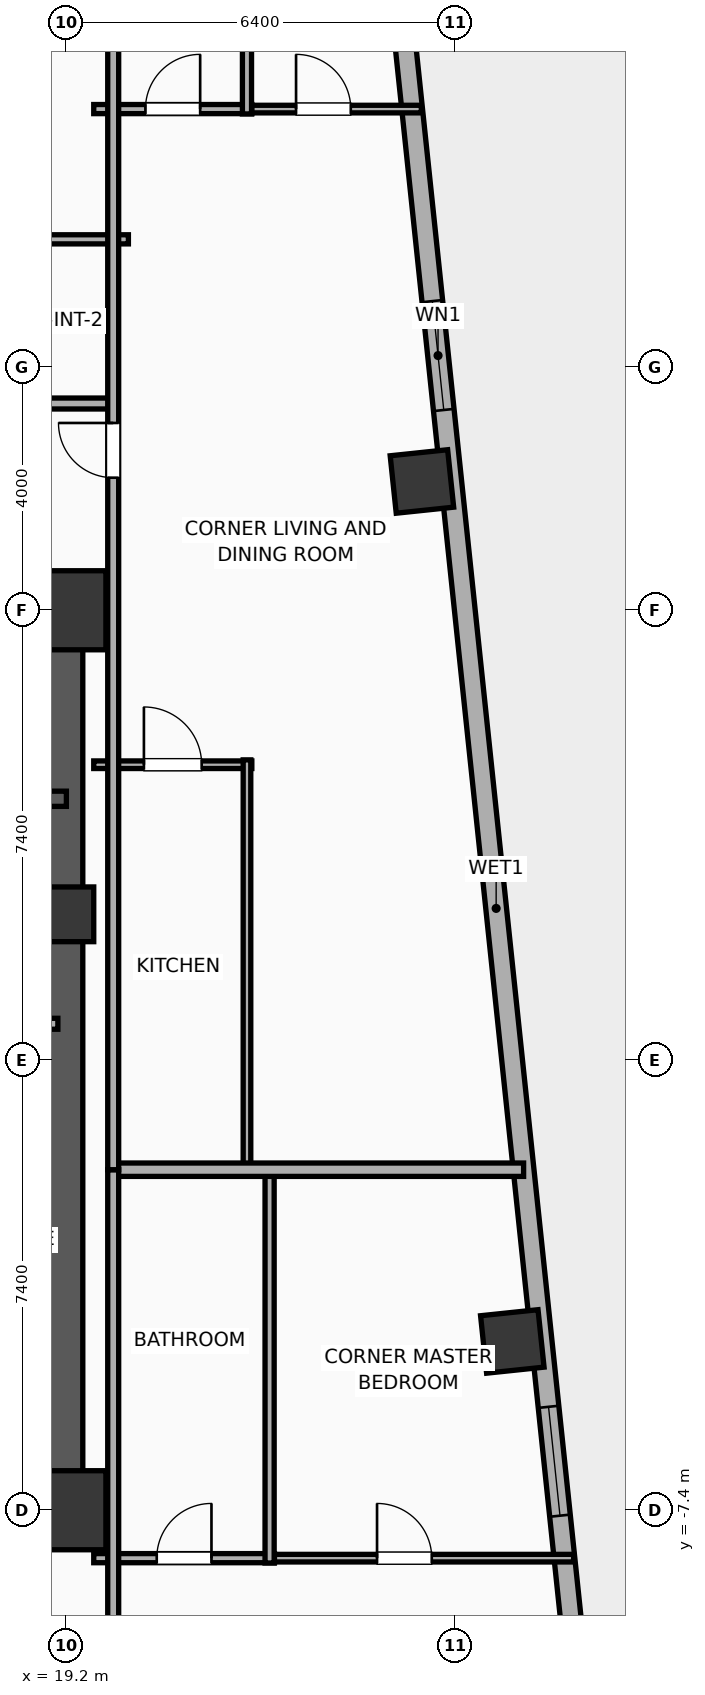
"""IFC4 building model, lengths in metres.
Left out: names, types, materials, properties, quantities, classifications, styles, units other than length and angle.
Written with IfcOpenShell. Run it as: python <this file> out.ifc"""

import sys

from ifc_helpers import new_model, si_unit, direction, frame, frame_2d, origin, origin_2d, place, context, subcontext, project, spatial, rectangle, hollow_rectangle, extrude, element, fill, save


model = new_model("IFC4")
c1 = context("Model", 3, precision=1e-05, world=origin(), true_north=direction((0.0, 1.0)))
c2 = subcontext(c1, "Body", "Model", "MODEL_VIEW")
j1 = project(units=[si_unit("LENGTHUNIT", "METRE"), si_unit("PLANEANGLEUNIT", "RADIAN")], contexts=[c1])
p1 = place(None, origin())
s1 = spatial("IfcSite", under=j1, at=p1, CompositionType="ELEMENT")
p2 = place(p1, origin())
s2 = spatial("IfcBuilding", under=s1, at=p2, CompositionType="ELEMENT")
p3 = place(p2, frame((0.0, 0.0, 140.4)))
s3 = spatial("IfcBuildingStorey", under=s2, at=p3, CompositionType="ELEMENT", Elevation=140.4)
p4 = place(p3, frame((19.2, -7.4, 0.0), z_axis=(0.0, 0.0, 1.0), x_axis=(1.0, 0.0, 0.0)))
e1 = element("IfcColumn", 1, at=p4, inside=s3, PredefinedType="COLUMN", context=c2, shape_type="SweptSolid", body=[
    extrude(rectangle(XDim=1.3, YDim=1.3, at=origin_2d()), origin(), (0.0, 0.0, 1.0), 3.9),
])
p5 = place(p3, frame((19.2, 2.4, 0.0), z_axis=(0.0, 0.0, 1.0), x_axis=(1.0, 0.0, 0.0)))
e2 = element("IfcColumn", 2, at=p5, inside=s3, PredefinedType="COLUMN", context=c2, shape_type="SweptSolid", body=[
    extrude(rectangle(XDim=0.9, YDim=0.9, at=origin_2d()), origin(), (0.0, 0.0, 1.0), 3.9),
])
p6 = place(p3, frame((19.2, 7.4, 0.0), z_axis=(0.0, 0.0, 1.0), x_axis=(1.0, 0.0, 0.0)))
e3 = element("IfcColumn", 3, at=p6, inside=s3, PredefinedType="COLUMN", context=c2, shape_type="SweptSolid", body=[
    extrude(rectangle(XDim=1.3, YDim=1.3, at=origin_2d()), origin(), (0.0, 0.0, 1.0), 3.9),
])
for number, where, z_axis, x_axis in (
    (4, (12.125, -7.4, 0.0), (0.0, 0.0, 1.0), (1.0, 0.0, 0.0)),
    (5, (12.125, 7.4, 0.0), (0.0, 0.0, 1.0), (1.0, 0.0, 0.0)),
):
    element("IfcWall", number, at=place(p3, frame(where, z_axis=z_axis, x_axis=x_axis)), inside=s3, PredefinedType="SHEAR", context=c2, shape_type="SweptSolid", body=[
        extrude(rectangle(XDim=7.35, YDim=0.55, at=frame_2d((3.675, 0.0))), origin(), (0.0, 0.0, 1.0), 3.65),
    ])
p7 = place(p3, frame((19.145, -7.4, 0.0), z_axis=(0.0, 0.0, 1.0), x_axis=(0.0, 1.0, 0.0)))
e6 = element("IfcWall", 6, at=p7, inside=s3, PredefinedType="SHEAR", context=c2, shape_type="SweptSolid", body=[
    extrude(rectangle(XDim=14.8, YDim=0.65, at=frame_2d((7.4, 0.0))), origin(), (0.0, 0.0, 1.0), 3.65),
])
p8 = place(p3, frame((15.74, -6.965, 0.0), z_axis=(0.0, 0.0, 1.0), x_axis=(1.0, 0.0, 0.0)))
e7 = element("IfcWall", 7, at=p8, inside=s3, PredefinedType="SOLIDWALL", context=c2, shape_type="SweptSolid", body=[
    extrude(rectangle(XDim=3.46, YDim=0.25, at=frame_2d((1.73, 0.0))), origin(), (0.0, 0.0, 1.0), 3.65),
])
for number, where, z_axis, x_axis in (
    (8, (26.533, -4.624, -0.4), (0.0, 0.0, 1.0), (0.995, 0.105, 0.0)),
    (9, (25.047, 9.518, -0.4), (0.0, 0.0, 1.0), (0.995, 0.105, 0.0)),
):
    element("IfcColumn", number, at=place(p3, frame(where, z_axis=z_axis, x_axis=x_axis)), inside=s3, PredefinedType="COLUMN", context=c2, shape_type="SweptSolid", body=[
        extrude(hollow_rectangle(XDim=0.95, YDim=0.95, WallThickness=0.032, at=origin_2d()), origin(), (0.0, 0.0, 1.0), 4.3),
    ])
p9 = place(p3, frame((24.534, 18.99, 0.0), z_axis=(0.0, 0.0, 1.0), x_axis=(0.104534959766, -0.994521212537, 0.0)))
e10 = element("IfcWall", 10, at=p9, inside=s3, PredefinedType="ELEMENTEDWALL", context=c2, shape_type="SweptSolid", body=[
    extrude(rectangle(XDim=33.166, YDim=0.34, at=frame_2d((16.583, 0.0))), origin(), (0.0, 0.0, 1.0), 2.54),
])
p10 = place(p9, frame((6.542, 0.0, 0.75)))
e11 = element("IfcOpeningElement", 11, at=p10, cuts=e10, PredefinedType="OPENING", context=c2, shape_type="SweptSolid", body=[
    extrude(rectangle(XDim=1.8, YDim=1.63, at=frame_2d((0.9, 0.815))), frame((0.0, 0.18, 0.0), z_axis=(0.0, -1.0, 0.0), x_axis=(1.0, 0.0, 0.0)), (0.0, 0.0, 1.0), 0.36),
])
p11 = place(p9, frame((24.825, 0.0, 0.75)))
e12 = element("IfcOpeningElement", 12, at=p11, cuts=e10, PredefinedType="OPENING", context=c2, shape_type="SweptSolid", body=[
    extrude(rectangle(XDim=1.8, YDim=1.63, at=frame_2d((0.9, 0.815))), frame((0.0, 0.18, 0.0), z_axis=(0.0, -1.0, 0.0), x_axis=(1.0, 0.0, 0.0)), (0.0, 0.0, 1.0), 0.36),
])
p12 = place(p3, frame((16.6, 4.3, 0.0), z_axis=(0.0, 0.0, 1.0), x_axis=(1.0, 0.0, 0.0)))
e13 = element("IfcWall", 13, at=p12, inside=s3, PredefinedType="SOLIDWALL", context=c2, shape_type="SweptSolid", body=[
    extrude(rectangle(XDim=2.6, YDim=0.25, at=frame_2d((1.3, 0.0))), origin(), (0.0, 0.0, 1.0), 3.65),
])
p13 = place(p3, frame((15.7, 0.6, 0.0), z_axis=(0.0, 0.0, 1.0), x_axis=(1.0, 0.0, 0.0)))
e14 = element("IfcWall", 14, at=p13, inside=s3, PredefinedType="PARTITIONING", context=c2, shape_type="SweptSolid", body=[
    extrude(rectangle(XDim=3.36, YDim=0.18, at=frame_2d((1.68, 0.0))), origin(), (0.0, 0.0, 1.0), 3.65),
])
p14 = place(p13, frame((1.155, 0.0, 0.0)))
e15 = element("IfcOpeningElement", 15, at=p14, cuts=e14, PredefinedType="OPENING", context=c2, shape_type="SweptSolid", body=[
    extrude(rectangle(XDim=1.05, YDim=2.05, at=frame_2d((0.525, 1.025))), frame((0.0, 0.1, 0.0), z_axis=(0.0, -1.0, 0.0), x_axis=(1.0, 0.0, 0.0)), (0.0, 0.0, 1.0), 0.2),
])
p15 = place(p3, frame((17.539, 13.5, 0.0), z_axis=(0.0, 0.0, 1.0), x_axis=(1.0, 0.0, 0.0)))
e16 = element("IfcWall", 16, at=p15, inside=s3, PredefinedType="PLUMBINGWALL", context=c2, shape_type="SweptSolid", body=[
    extrude(rectangle(XDim=2.681, YDim=0.15, at=frame_2d((1.34, 0.0))), origin(), (0.0, 0.0, 1.0), 3.65),
])
p16 = place(p3, frame((8.08, 10.8, 0.0), z_axis=(0.0, 0.0, 1.0), x_axis=(1.0, 0.0, 0.0)))
e17 = element("IfcWall", 17, at=p16, inside=s3, PredefinedType="PARTITIONING", context=c2, shape_type="SweptSolid", body=[
    extrude(rectangle(XDim=11.92, YDim=0.18, at=frame_2d((5.96, 0.0))), origin(), (0.0, 0.0, 1.0), 3.65),
])
p17 = place(p16, frame((2.646, 0.0, 0.0)))
e18 = element("IfcOpeningElement", 18, at=p17, cuts=e17, PredefinedType="OPENING", context=c2, shape_type="SweptSolid", body=[
    extrude(rectangle(XDim=0.9, YDim=2.05, at=frame_2d((0.45, 1.025))), frame((0.0, 0.1, 0.0), z_axis=(0.0, -1.0, 0.0), x_axis=(1.0, 0.0, 0.0)), (0.0, 0.0, 1.0), 0.2),
])
p18 = place(p16, frame((7.179, 0.0, 0.0)))
e19 = element("IfcOpeningElement", 19, at=p18, cuts=e17, PredefinedType="OPENING", context=c2, shape_type="SweptSolid", body=[
    extrude(rectangle(XDim=1.15, YDim=2.05, at=frame_2d((0.575, 1.025))), frame((0.0, 0.1, 0.0), z_axis=(0.0, -1.0, 0.0), x_axis=(1.0, 0.0, 0.0)), (0.0, 0.0, 1.0), 0.2),
])
p19 = place(p3, frame((22.482, -8.188, 0.0), z_axis=(0.0, 0.0, 1.0), x_axis=(1.0, 0.0, 0.0)))
e20 = element("IfcWall", 20, at=p19, inside=s3, PredefinedType="PARTITIONING", context=c2, shape_type="SweptSolid", body=[
    extrude(rectangle(XDim=5.06, YDim=0.125, at=frame_2d((2.53, 0.0))), origin(), (0.0, 0.0, 1.0), 3.65),
])
p20 = place(p19, frame((1.827, 0.0, 0.0)))
e21 = element("IfcOpeningElement", 21, at=p20, cuts=e20, PredefinedType="OPENING", context=c2, shape_type="SweptSolid", body=[
    extrude(rectangle(XDim=0.9, YDim=2.05, at=frame_2d((0.45, 1.025))), frame((0.0, 0.073, 0.0), z_axis=(0.0, -1.0, 0.0), x_axis=(1.0, 0.0, 0.0)), (0.0, 0.0, 1.0), 0.145),
])
p21 = place(p3, frame((19.65, -8.188, 0.0), z_axis=(0.0, 0.0, 1.0), x_axis=(1.0, 0.0, 0.0)))
e22 = element("IfcWall", 22, at=p21, inside=s3, PredefinedType="PLUMBINGWALL", context=c2, shape_type="SweptSolid", body=[
    extrude(rectangle(XDim=2.972, YDim=0.15, at=frame_2d((1.486, 0.0))), origin(), (0.0, 0.0, 1.0), 3.65),
])
p22 = place(p21, frame((1.036, 0.0, 0.0)))
e23 = element("IfcOpeningElement", 23, at=p22, cuts=e22, PredefinedType="OPENING", context=c2, shape_type="SweptSolid", body=[
    extrude(rectangle(XDim=0.9, YDim=2.05, at=frame_2d((0.45, 1.025))), frame((0.0, 0.085, 0.0), z_axis=(0.0, -1.0, 0.0), x_axis=(1.0, 0.0, 0.0)), (0.0, 0.0, 1.0), 0.17),
])
p23 = place(p3, frame((22.542, -8.268, 0.0), z_axis=(0.0, 0.0, 1.0), x_axis=(0.0, 1.0, 0.0)))
e24 = element("IfcWall", 24, at=p23, inside=s3, PredefinedType="PLUMBINGWALL", context=c2, shape_type="SweptSolid", body=[
    extrude(rectangle(XDim=6.448, YDim=0.15, at=frame_2d((3.224, 0.0))), origin(), (0.0, 0.0, 1.0), 3.65),
])
p24 = place(p3, frame((22.11, 15.642, 0.0), z_axis=(0.0, 0.0, 1.0), x_axis=(1.0, 0.0, 0.0)))
e25 = element("IfcWall", 25, at=p24, inside=s3, PredefinedType="PARTITIONING", context=c2, shape_type="SweptSolid", body=[
    extrude(rectangle(XDim=2.927, YDim=0.125, at=frame_2d((1.463, 0.0))), origin(), (0.0, 0.0, 1.0), 3.65),
])
p25 = place(p24, frame((0.867, 0.0, 0.0)))
e26 = element("IfcOpeningElement", 26, at=p25, cuts=e25, PredefinedType="OPENING", context=c2, shape_type="SweptSolid", body=[
    extrude(rectangle(XDim=0.9, YDim=2.05, at=frame_2d((0.45, 1.025))), frame((0.0, 0.073, 0.0), z_axis=(0.0, -1.0, 0.0), x_axis=(1.0, 0.0, 0.0)), (0.0, 0.0, 1.0), 0.145),
])
p26 = place(p3, frame((19.65, 4.86, 0.0), z_axis=(0.0, 0.0, 1.0), x_axis=(1.0, 0.0, 0.0)))
e27 = element("IfcWall", 27, at=p26, inside=s3, PredefinedType="PARTITIONING", context=c2, shape_type="SweptSolid", body=[
    extrude(rectangle(XDim=2.6, YDim=0.125, at=frame_2d((1.3, 0.0))), origin(), (0.0, 0.0, 1.0), 3.65),
])
p27 = place(p26, frame((0.825, 0.0, 0.0)))
e28 = element("IfcOpeningElement", 28, at=p27, cuts=e27, PredefinedType="OPENING", context=c2, shape_type="SweptSolid", body=[
    extrude(rectangle(XDim=0.95, YDim=2.05, at=frame_2d((0.475, 1.025))), frame((0.0, 0.073, 0.0), z_axis=(0.0, -1.0, 0.0), x_axis=(1.0, 0.0, 0.0)), (0.0, 0.0, 1.0), 0.145),
])
p28 = place(p3, frame((19.65, 15.642, 0.0), z_axis=(0.0, 0.0, 1.0), x_axis=(1.0, 0.0, 0.0)))
e29 = element("IfcWall", 29, at=p28, inside=s3, PredefinedType="PLUMBINGWALL", context=c2, shape_type="SweptSolid", body=[
    extrude(rectangle(XDim=2.6, YDim=0.15, at=frame_2d((1.3, 0.0))), origin(), (0.0, 0.0, 1.0), 3.65),
])
p29 = place(p28, frame((0.85, 0.0, 0.0)))
e30 = element("IfcOpeningElement", 30, at=p29, cuts=e29, PredefinedType="OPENING", context=c2, shape_type="SweptSolid", body=[
    extrude(rectangle(XDim=0.9, YDim=2.05, at=frame_2d((0.45, 1.025))), frame((0.0, 0.085, 0.0), z_axis=(0.0, -1.0, 0.0), x_axis=(1.0, 0.0, 0.0)), (0.0, 0.0, 1.0), 0.17),
])
p30 = place(p3, frame((22.17, -1.78, 0.0), z_axis=(0.0, 0.0, 1.0), x_axis=(0.0, 1.0, 0.0)))
e31 = element("IfcWall", 31, at=p30, inside=s3, PredefinedType="PARTITIONING", context=c2, shape_type="SweptSolid", body=[
    extrude(rectangle(XDim=6.72, YDim=0.125, at=frame_2d((3.36, 0.0))), origin(), (0.0, 0.0, 1.0), 3.65),
])
p31 = place(p3, frame((22.17, 15.562, 0.0), z_axis=(0.0, 0.0, 1.0), x_axis=(0.0, 1.0, 0.0)))
e32 = element("IfcWall", 32, at=p31, inside=s3, PredefinedType="PLUMBINGWALL", context=c2, shape_type="SweptSolid", body=[
    extrude(rectangle(XDim=6.597, YDim=0.15, at=frame_2d((3.299, 0.0))), origin(), (0.0, 0.0, 1.0), 2.54),
])
p32 = place(p3, frame((19.97, -1.8, 0.0), z_axis=(0.0, 0.0, 1.0), x_axis=(1.0, 0.0, 0.0)))
e33 = element("IfcWall", 33, at=p32, inside=s3, PredefinedType="PARTITIONING", context=c2, shape_type="SweptSolid", body=[
    extrude(rectangle(XDim=6.749, YDim=0.22, at=frame_2d((3.375, 0.0))), origin(), (0.0, 0.0, 1.0), 3.65),
])
p33 = place(p3, frame((19.97, -18.506, 0.0), z_axis=(0.0, 0.0, 1.0), x_axis=(0.0, 1.0, 0.0)))
e34 = element("IfcWall", 34, at=p33, inside=s3, PredefinedType="PARTITIONING", context=c2, shape_type="SweptSolid", body=[
    extrude(rectangle(XDim=16.706, YDim=0.18, at=frame_2d((8.353, 0.0))), origin(), (0.0, 0.0, 1.0), 3.65),
])
p34 = place(p33, frame((8.027, 0.0, 0.0)))
e35 = element("IfcOpeningElement", 35, at=p34, cuts=e34, PredefinedType="OPENING", context=c2, shape_type="SweptSolid", body=[
    extrude(rectangle(XDim=0.9, YDim=2.05, at=frame_2d((0.45, 1.025))), frame((0.0, 0.1, 0.0), z_axis=(0.0, -1.0, 0.0), x_axis=(1.0, 0.0, 0.0)), (0.0, 0.0, 1.0), 0.2),
])
p35 = place(p3, frame((19.97, -1.8, 0.0), z_axis=(0.0, 0.0, 1.0), x_axis=(0.0, 1.0, 0.0)))
e36 = element("IfcWall", 36, at=p35, inside=s3, PredefinedType="PARTITIONING", context=c2, shape_type="SweptSolid", body=[
    extrude(rectangle(XDim=23.977, YDim=0.18, at=frame_2d((11.988, 0.0))), origin(), (0.0, 0.0, 1.0), 2.54),
])
p36 = place(p35, frame((11.38, 0.0, 0.0)))
e37 = element("IfcOpeningElement", 37, at=p36, cuts=e36, PredefinedType="OPENING", context=c2, shape_type="SweptSolid", body=[
    extrude(rectangle(XDim=0.9, YDim=2.05, at=frame_2d((0.45, 1.025))), frame((0.0, 0.1, 0.0), z_axis=(0.0, -1.0, 0.0), x_axis=(1.0, 0.0, 0.0)), (0.0, 0.0, 1.0), 0.2),
])
p37 = place(p10, origin())
e38 = element("IfcWindow", 38, at=p37, inside=s3, PartitioningType="SINGLE_PANEL", PredefinedType="WINDOW", context=c2, shape_type="SweptSolid", body=[
    extrude(rectangle(XDim=1.8, YDim=1.63, at=frame_2d((0.9, 0.815))), frame((0.0, 0.03, 0.0), z_axis=(0.0, -1.0, 0.0), x_axis=(1.0, 0.0, 0.0)), (0.0, 0.0, 1.0), 0.06),
])
fill(e11, e38)
p38 = place(p11, origin())
e39 = element("IfcWindow", 39, at=p38, inside=s3, PartitioningType="SINGLE_PANEL", PredefinedType="WINDOW", context=c2, shape_type="SweptSolid", body=[
    extrude(rectangle(XDim=1.8, YDim=1.63, at=frame_2d((0.9, 0.815))), frame((0.0, 0.03, 0.0), z_axis=(0.0, -1.0, 0.0), x_axis=(1.0, 0.0, 0.0)), (0.0, 0.0, 1.0), 0.06),
])
fill(e12, e39)
p39 = place(p20, origin())
e40 = element("IfcDoor", 40, at=p39, inside=s3, OperationType="SINGLE_SWING_LEFT", PredefinedType="DOOR", context=c2, shape_type="SweptSolid", body=[
    extrude(rectangle(XDim=0.9, YDim=2.05, at=frame_2d((0.45, 1.025))), frame((0.0, 0.025, 0.0), z_axis=(0.0, -1.0, 0.0), x_axis=(1.0, 0.0, 0.0)), (0.0, 0.0, 1.0), 0.05),
])
fill(e21, e40)
p40 = place(p22, origin())
e41 = element("IfcDoor", 41, at=p40, inside=s3, OperationType="SINGLE_SWING_RIGHT", PredefinedType="DOOR", context=c2, shape_type="SweptSolid", body=[
    extrude(rectangle(XDim=0.9, YDim=2.05, at=frame_2d((0.45, 1.025))), frame((0.0, 0.025, 0.0), z_axis=(0.0, -1.0, 0.0), x_axis=(1.0, 0.0, 0.0)), (0.0, 0.0, 1.0), 0.05),
])
fill(e23, e41)
p41 = place(p25, origin())
e42 = element("IfcDoor", 42, at=p41, inside=s3, OperationType="SINGLE_SWING_LEFT", PredefinedType="DOOR", context=c2, shape_type="SweptSolid", body=[
    extrude(rectangle(XDim=0.9, YDim=2.05, at=frame_2d((0.45, 1.025))), frame((0.0, 0.025, 0.0), z_axis=(0.0, -1.0, 0.0), x_axis=(1.0, 0.0, 0.0)), (0.0, 0.0, 1.0), 0.05),
])
fill(e26, e42)
p42 = place(p27, origin())
e43 = element("IfcDoor", 43, at=p42, inside=s3, OperationType="SINGLE_SWING_LEFT", PredefinedType="DOOR", context=c2, shape_type="SweptSolid", body=[
    extrude(rectangle(XDim=0.95, YDim=2.05, at=frame_2d((0.475, 1.025))), frame((0.0, 0.025, 0.0), z_axis=(0.0, -1.0, 0.0), x_axis=(1.0, 0.0, 0.0)), (0.0, 0.0, 1.0), 0.05),
])
fill(e28, e43)
p43 = place(p29, origin())
e44 = element("IfcDoor", 44, at=p43, inside=s3, OperationType="SINGLE_SWING_RIGHT", PredefinedType="DOOR", context=c2, shape_type="SweptSolid", body=[
    extrude(rectangle(XDim=0.9, YDim=2.05, at=frame_2d((0.45, 1.025))), frame((0.0, 0.025, 0.0), z_axis=(0.0, -1.0, 0.0), x_axis=(1.0, 0.0, 0.0)), (0.0, 0.0, 1.0), 0.05),
])
fill(e30, e44)
p44 = place(p36, origin())
e45 = element("IfcDoor", 45, at=p44, inside=s3, OperationType="SINGLE_SWING_RIGHT", PredefinedType="DOOR", context=c2, shape_type="SweptSolid", body=[
    extrude(rectangle(XDim=0.9, YDim=2.05, at=frame_2d((0.45, 1.025))), frame((0.0, 0.025, 0.0), z_axis=(0.0, -1.0, 0.0), x_axis=(1.0, 0.0, 0.0)), (0.0, 0.0, 1.0), 0.05),
])
fill(e37, e45)
save(model, sys.argv[1])
